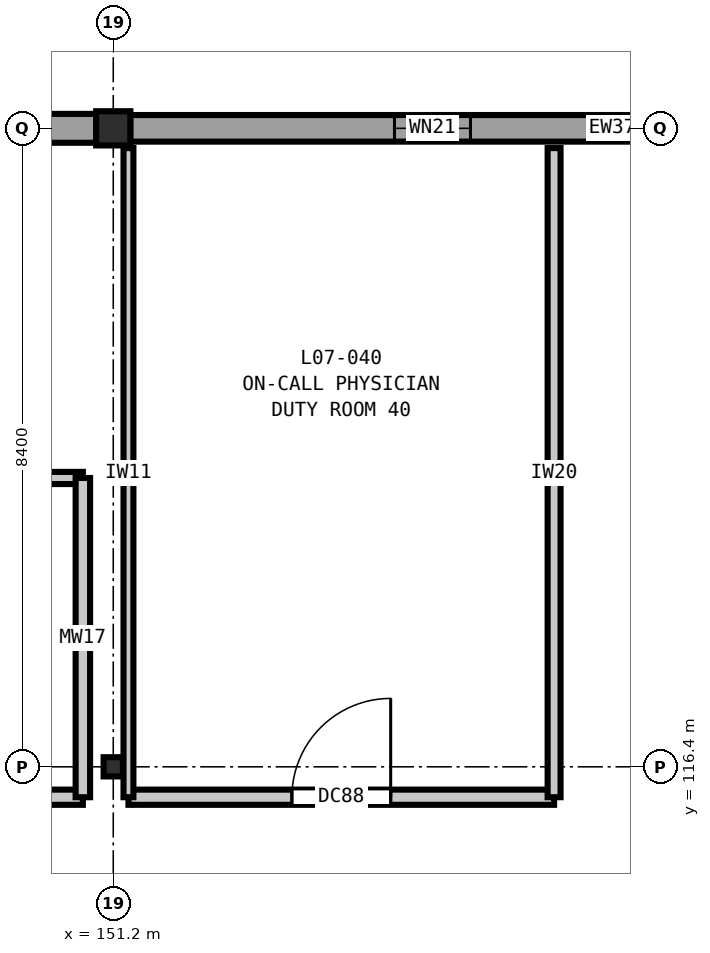
"""IFC4 building model, lengths in metres.
Left out: names, types, materials, properties, quantities, classifications, styles, units other than length and angle.
Written with IfcOpenShell. Run it as: python <this file> out.ifc"""

import sys

from ifc_helpers import new_model, si_unit, direction, frame, frame_2d, origin, origin_2d, place, context, subcontext, project, spatial, rectangle, i_section, extrude, element, fill, save


model = new_model("IFC4")
c1 = context("Model", 3, precision=1e-05, world=origin(), true_north=direction((0.0, 1.0)))
c2 = subcontext(c1, "Body", "Model", "MODEL_VIEW")
j1 = project(units=[si_unit("LENGTHUNIT", "METRE"), si_unit("PLANEANGLEUNIT", "RADIAN")], contexts=[c1])
p1 = place(None, origin())
s1 = spatial("IfcSite", under=j1, at=p1, CompositionType="ELEMENT")
p2 = place(p1, origin())
s2 = spatial("IfcBuilding", under=s1, at=p2, CompositionType="ELEMENT")
p3 = place(p2, frame((0.0, 0.0, 33.0)))
s3 = spatial("IfcBuildingStorey", under=s2, at=p3, CompositionType="ELEMENT", Elevation=33.0)
p4 = place(p3, frame((151.2, 116.4, 0.0), z_axis=(0.0, 0.0, 1.0), x_axis=(1.0, 0.0, 0.0)))
e1 = element("IfcColumn", 1, at=p4, inside=s3, PredefinedType="COLUMN", context=c2, shape_type="SweptSolid", body=[
    extrude(i_section(OverallWidth=0.254, OverallDepth=0.253, WebThickness=0.009, FlangeThickness=0.014, FilletRadius=0.013, at=origin_2d()), origin(), (0.0, 0.0, 1.0), 4.2),
])
p5 = place(p3, frame((151.2, 124.8, 0.0), z_axis=(0.0, 0.0, 1.0), x_axis=(1.0, 0.0, 0.0)))
e2 = element("IfcColumn", 2, at=p5, inside=s3, PredefinedType="COLUMN", context=c2, shape_type="SweptSolid", body=[
    extrude(rectangle(XDim=0.45, YDim=0.45, at=origin_2d()), origin(), (0.0, 0.0, 1.0), 4.2),
])
p6 = place(p3, frame((143.023, 124.8, 0.0), z_axis=(0.0, 0.0, 1.0), x_axis=(1.0, 0.0, 0.0)))
e3 = element("IfcWall", 3, at=p6, inside=s3, PredefinedType="SOLIDWALL", context=c2, shape_type="SweptSolid", body=[
    extrude(rectangle(XDim=7.954, YDim=0.38, at=frame_2d((3.977, 0.0))), origin(), (0.0, 0.0, 1.0), 3.48),
])
p7 = place(p6, frame((3.527, 0.0, 0.9)))
e4 = element("IfcOpeningElement", 4, at=p7, cuts=e3, PredefinedType="OPENING", context=c2, shape_type="SweptSolid", body=[
    extrude(rectangle(XDim=0.9, YDim=1.55, at=frame_2d((0.45, 0.775))), frame((0.0, 0.2, 0.0), z_axis=(0.0, -1.0, 0.0), x_axis=(1.0, 0.0, 0.0)), (0.0, 0.0, 1.0), 0.4),
])
p8 = place(p3, frame((151.423, 124.8, 0.0), z_axis=(0.0, 0.0, 1.0), x_axis=(1.0, 0.0, 0.0)))
e5 = element("IfcWall", 5, at=p8, inside=s3, PredefinedType="SOLIDWALL", context=c2, shape_type="SweptSolid", body=[
    extrude(rectangle(XDim=7.954, YDim=0.35, at=frame_2d((3.977, 0.0))), origin(), (0.0, 0.0, 1.0), 3.48),
])
p9 = place(p8, frame((3.477, 0.0, 0.9)))
e6 = element("IfcOpeningElement", 6, at=p9, cuts=e5, PredefinedType="OPENING", context=c2, shape_type="SweptSolid", body=[
    extrude(rectangle(XDim=1.0, YDim=1.55, at=frame_2d((0.5, 0.775))), frame((0.0, 0.185, 0.0), z_axis=(0.0, -1.0, 0.0), x_axis=(1.0, 0.0, 0.0)), (0.0, 0.0, 1.0), 0.37),
])
p10 = place(p3, frame((143.2, 116.0, 0.0), z_axis=(0.0, 0.0, 1.0), x_axis=(1.0, 0.0, 0.0)))
e7 = element("IfcWall", 7, at=p10, inside=s3, PredefinedType="PARTITIONING", context=c2, shape_type="SweptSolid", body=[
    extrude(rectangle(XDim=7.6, YDim=0.2, at=frame_2d((3.8, 0.0))), origin(), (0.0, 0.0, 1.0), 3.92),
])
p11 = place(p10, frame((3.28, 0.0, 0.0)))
e8 = element("IfcOpeningElement", 8, at=p11, cuts=e7, PredefinedType="OPENING", context=c2, shape_type="SweptSolid", body=[
    extrude(rectangle(XDim=1.04, YDim=2.1, at=frame_2d((0.52, 1.05))), frame((0.0, 0.11, 0.0), z_axis=(0.0, -1.0, 0.0), x_axis=(1.0, 0.0, 0.0)), (0.0, 0.0, 1.0), 0.22),
])
p12 = place(p3, frame((151.4, 116.0, 0.0), z_axis=(0.0, 0.0, 1.0), x_axis=(1.0, 0.0, 0.0)))
e9 = element("IfcWall", 9, at=p12, inside=s3, PredefinedType="PARTITIONING", context=c2, shape_type="SweptSolid", body=[
    extrude(rectangle(XDim=5.6, YDim=0.2, at=frame_2d((2.8, 0.0))), origin(), (0.0, 0.0, 1.0), 3.92),
])
p13 = place(p12, frame((2.15, 0.0, 0.0)))
e10 = element("IfcOpeningElement", 10, at=p13, cuts=e9, PredefinedType="OPENING", context=c2, shape_type="SweptSolid", body=[
    extrude(rectangle(XDim=1.3, YDim=2.2, at=frame_2d((0.65, 1.1))), frame((0.0, 0.11, 0.0), z_axis=(0.0, -1.0, 0.0), x_axis=(1.0, 0.0, 0.0)), (0.0, 0.0, 1.0), 0.22),
])
p14 = place(p3, frame((143.2, 120.2, 0.0), z_axis=(0.0, 0.0, 1.0), x_axis=(1.0, 0.0, 0.0)))
e11 = element("IfcWall", 11, at=p14, inside=s3, PredefinedType="PLUMBINGWALL", context=c2, shape_type="SweptSolid", body=[
    extrude(rectangle(XDim=7.6, YDim=0.16, at=frame_2d((3.8, 0.0))), origin(), (0.0, 0.0, 1.0), 3.92),
])
p15 = place(p3, frame((150.8, 116.0, 0.0), z_axis=(0.0, 0.0, 1.0), x_axis=(0.0, 1.0, 0.0)))
e12 = element("IfcWall", 12, at=p15, inside=s3, PredefinedType="PLUMBINGWALL", context=c2, shape_type="SweptSolid", body=[
    extrude(rectangle(XDim=4.2, YDim=0.19, at=frame_2d((2.1, 0.0))), origin(), (0.0, 0.0, 1.0), 3.92),
])
p16 = place(p3, frame((151.4, 116.0, 0.0), z_axis=(0.0, 0.0, 1.0), x_axis=(0.0, 1.0, 0.0)))
e13 = element("IfcWall", 13, at=p16, inside=s3, PredefinedType="PARTITIONING", context=c2, shape_type="SweptSolid", body=[
    extrude(rectangle(XDim=8.54, YDim=0.13, at=frame_2d((4.27, 0.0))), origin(), (0.0, 0.0, 1.0), 3.635),
])
p17 = place(p3, frame((157.0, 116.0, 0.0), z_axis=(0.0, 0.0, 1.0), x_axis=(0.0, 1.0, 0.0)))
e14 = element("IfcWall", 14, at=p17, inside=s3, PredefinedType="PARTITIONING", context=c2, shape_type="SweptSolid", body=[
    extrude(rectangle(XDim=8.54, YDim=0.17, at=frame_2d((4.27, 0.0))), origin(), (0.0, 0.0, 1.0), 3.92),
])
p18 = place(p9, origin())
e15 = element("IfcWindow", 15, at=p18, inside=s3, PartitioningType="SINGLE_PANEL", PredefinedType="WINDOW", context=c2, shape_type="SweptSolid", body=[
    extrude(rectangle(XDim=1.0, YDim=1.55, at=frame_2d((0.5, 0.775))), frame((0.0, 0.03, 0.0), z_axis=(0.0, -1.0, 0.0), x_axis=(1.0, 0.0, 0.0)), (0.0, 0.0, 1.0), 0.06),
])
fill(e6, e15)
p19 = place(p13, origin())
e16 = element("IfcDoor", 16, at=p19, inside=s3, OperationType="SINGLE_SWING_RIGHT", PredefinedType="DOOR", context=c2, shape_type="SweptSolid", body=[
    extrude(rectangle(XDim=1.3, YDim=2.2, at=frame_2d((0.65, 1.1))), frame((0.0, 0.025, 0.0), z_axis=(0.0, -1.0, 0.0), x_axis=(1.0, 0.0, 0.0)), (0.0, 0.0, 1.0), 0.05),
])
fill(e10, e16)
save(model, sys.argv[1])
